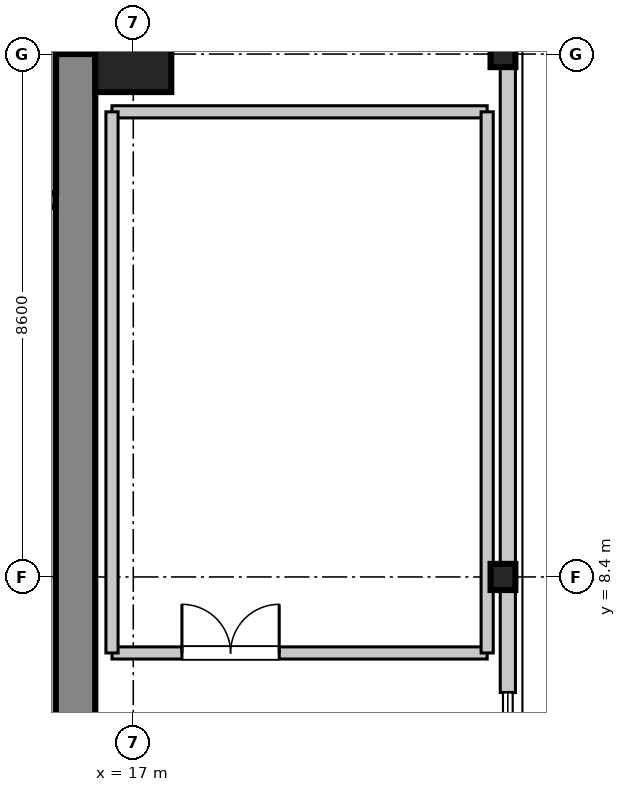
"""IFC4 building model, lengths in metres.
Left out: names, types, materials, properties, quantities, classifications, styles, units other than length and angle.
Written with IfcOpenShell. Run it as: python <this file> out.ifc"""

import sys

from ifc_helpers import new_model, si_unit, direction, frame, frame_2d, origin, origin_2d, place, context, subcontext, project, spatial, rectangle, i_section, extrude, source, transform, mapped, element, fill, save


model = new_model("IFC4")
c1 = context("Model", 3, precision=1e-05, world=origin(), true_north=direction((0.0, 1.0)))
c2 = subcontext(c1, "Body", "Model", "MODEL_VIEW")
j1 = project(units=[si_unit("LENGTHUNIT", "METRE"), si_unit("PLANEANGLEUNIT", "RADIAN")], contexts=[c1])
p1 = place(None, origin())
s1 = spatial("IfcSite", under=j1, at=p1, CompositionType="ELEMENT")
p2 = place(p1, origin())
s2 = spatial("IfcBuilding", under=s1, at=p2, CompositionType="ELEMENT")
p3 = place(p2, frame((0.0, 0.0, 144.2)))
s3 = spatial("IfcBuildingStorey", under=s2, at=p3, CompositionType="ELEMENT", Elevation=144.2)
m1 = source(origin(), c2, "Body", "SweptSolid", [
    extrude(rectangle(XDim=1.25, YDim=1.25, at=origin_2d()), origin(), (0.0, 0.0, 1.0), 4.755),
])
p4 = place(p3, frame((17.0, 17.0, 0.0), z_axis=(0.0, 0.0, 1.0), x_axis=(1.0, 0.0, 0.0)))
e1 = element("IfcColumn", 1, at=p4, inside=s3, PredefinedType="COLUMN", context=c2, shape_type="MappedRepresentation", body=[
    mapped(m1, transform((0.0, 0.0, 0.0), scale=1.0)),
])
m2 = source(origin(), c2, "Body", "SweptSolid", [
    extrude(i_section(OverallWidth=0.409, OverallDepth=0.43, WebThickness=0.021, FlangeThickness=0.034, at=origin_2d()), origin(), (0.0, 0.0, 1.0), 4.694),
])
for number, where, z_axis, x_axis in (
    (2, (23.08, 8.4, 0.0), (-0.128, 0.0, 0.992), (0.0, -1.0, 0.0)),
    (3, (23.08, 17.0, 0.0), (-0.128, 0.0, 0.992), (0.0, -1.0, 0.0)),
):
    element("IfcColumn", number, at=place(p3, frame(where, z_axis=z_axis, x_axis=x_axis)), inside=s3, PredefinedType="COLUMN", context=c2, shape_type="MappedRepresentation", body=[
        mapped(m2, transform((0.0, 0.0, 0.0), scale=1.0)),
    ])
m3 = source(origin(), c2, "Body", "SweptSolid", [
    extrude(rectangle(XDim=11.6, YDim=0.65, at=frame_2d((5.8, 0.0))), origin(), (0.0, 0.0, 1.0), 4.54),
])
p5 = place(p3, frame((16.05, 5.4, 0.0), z_axis=(0.0, 0.0, 1.0), x_axis=(0.0, 1.0, 0.0)))
e4 = element("IfcWall", 4, at=p5, inside=s3, PredefinedType="SHEAR", context=c2, shape_type="MappedRepresentation", body=[
    mapped(m3, transform((0.0, 0.0, 0.0), scale=1.0)),
])
m4 = source(origin(), c2, "Body", "SweptSolid", [
    extrude(rectangle(XDim=2.6, YDim=0.22, at=frame_2d((1.3, 0.0))), origin(), (0.0, 0.0, 1.0), 4.54),
])
p6 = place(p3, frame((15.62, 14.71, 0.0), z_axis=(0.0, 0.0, 1.0), x_axis=(0.0, 1.0, 0.0)))
e5 = element("IfcWall", 5, at=p6, inside=s3, PredefinedType="SHEAR", context=c2, shape_type="MappedRepresentation", body=[
    mapped(m4, transform((0.0, 0.0, 0.0), scale=1.0)),
])
m5 = source(origin(), c2, "Body", "SweptSolid", [
    extrude(rectangle(XDim=2.255, YDim=0.22, at=frame_2d((1.127, 0.0))), origin(), (0.0, 0.0, 1.0), 4.54),
])
p7 = place(p3, frame((13.47, 14.6, 0.0), z_axis=(0.0, 0.0, 1.0), x_axis=(1.0, 0.0, 0.0)))
e6 = element("IfcWall", 6, at=p7, inside=s3, PredefinedType="SHEAR", context=c2, shape_type="MappedRepresentation", body=[
    mapped(m5, transform((0.0, 0.0, 0.0), scale=1.0)),
])
m6 = source(origin(), c2, "Body", "SweptSolid", [
    extrude(rectangle(XDim=13.86, YDim=0.25, at=frame_2d((6.93, 0.0))), origin(), (0.0, 0.0, 1.0), 4.02),
])
p8 = place(p3, frame((23.16, 6.5, 0.0), z_axis=(0.0, 0.0, 1.0), x_axis=(0.0, 1.0, 0.0)))
e7 = element("IfcWall", 7, at=p8, inside=s3, PredefinedType="STANDARD", context=c2, shape_type="MappedRepresentation", body=[
    mapped(m6, transform((0.0, 0.0, 0.0), scale=1.0)),
])
m7 = source(origin(), c2, "Body", "SweptSolid", [
    extrude(rectangle(XDim=6.17, YDim=0.2, at=frame_2d((3.085, 0.0))), origin(), (0.0, 0.0, 1.0), 3.4),
])
p9 = place(p3, frame((16.65, 7.15, 0.0), z_axis=(0.0, 0.0, 1.0), x_axis=(1.0, 0.0, 0.0)))
e8 = element("IfcWall", 8, at=p9, inside=s3, PredefinedType="PARTITIONING", context=c2, shape_type="MappedRepresentation", body=[
    mapped(m7, transform((0.0, 0.0, 0.0), scale=1.0)),
])
p10 = place(p9, frame((1.15, 0.0, 0.0)))
e9 = element("IfcOpeningElement", 9, at=p10, cuts=e8, PredefinedType="OPENING", context=c2, shape_type="SweptSolid", body=[
    extrude(rectangle(XDim=1.6, YDim=2.15, at=frame_2d((0.8, 1.075))), frame((0.0, 0.11, 0.0), z_axis=(0.0, -1.0, 0.0), x_axis=(1.0, 0.0, 0.0)), (0.0, 0.0, 1.0), 0.22),
])
p11 = place(p3, frame((16.65, 16.05, 0.0), z_axis=(0.0, 0.0, 1.0), x_axis=(1.0, 0.0, 0.0)))
e10 = element("IfcWall", 10, at=p11, inside=s3, PredefinedType="PARTITIONING", context=c2, shape_type="MappedRepresentation", body=[
    mapped(m7, transform((0.0, 0.0, 0.0), scale=1.0)),
])
m8 = source(origin(), c2, "Body", "SweptSolid", [
    extrude(rectangle(XDim=8.9, YDim=0.2, at=frame_2d((4.45, 0.0))), origin(), (0.0, 0.0, 1.0), 3.4),
])
for number, where, z_axis, x_axis in (
    (11, (16.65, 7.15, 0.0), (0.0, 0.0, 1.0), (0.0, 1.0, 0.0)),
    (12, (22.82, 7.15, 0.0), (0.0, 0.0, 1.0), (0.0, 1.0, 0.0)),
):
    element("IfcWall", number, at=place(p3, frame(where, z_axis=z_axis, x_axis=x_axis)), inside=s3, PredefinedType="PARTITIONING", context=c2, shape_type="MappedRepresentation", body=[
        mapped(m8, transform((0.0, 0.0, 0.0), scale=1.0)),
    ])
m9 = source(origin(), c2, "Body", "SweptSolid", [
    extrude(rectangle(XDim=1.6, YDim=2.15, at=frame_2d((0.8, 1.075))), frame((0.0, 0.025, 0.0), z_axis=(0.0, -1.0, 0.0), x_axis=(1.0, 0.0, 0.0)), (0.0, 0.0, 1.0), 0.05),
])
p12 = place(p10, origin())
e13 = element("IfcDoor", 13, at=p12, inside=s3, OperationType="DOUBLE_DOOR_SINGLE_SWING", PredefinedType="DOOR", context=c2, shape_type="MappedRepresentation", body=[
    mapped(m9, transform((0.0, 0.0, 0.0), scale=1.0)),
])
fill(e9, e13)
save(model, sys.argv[1])
